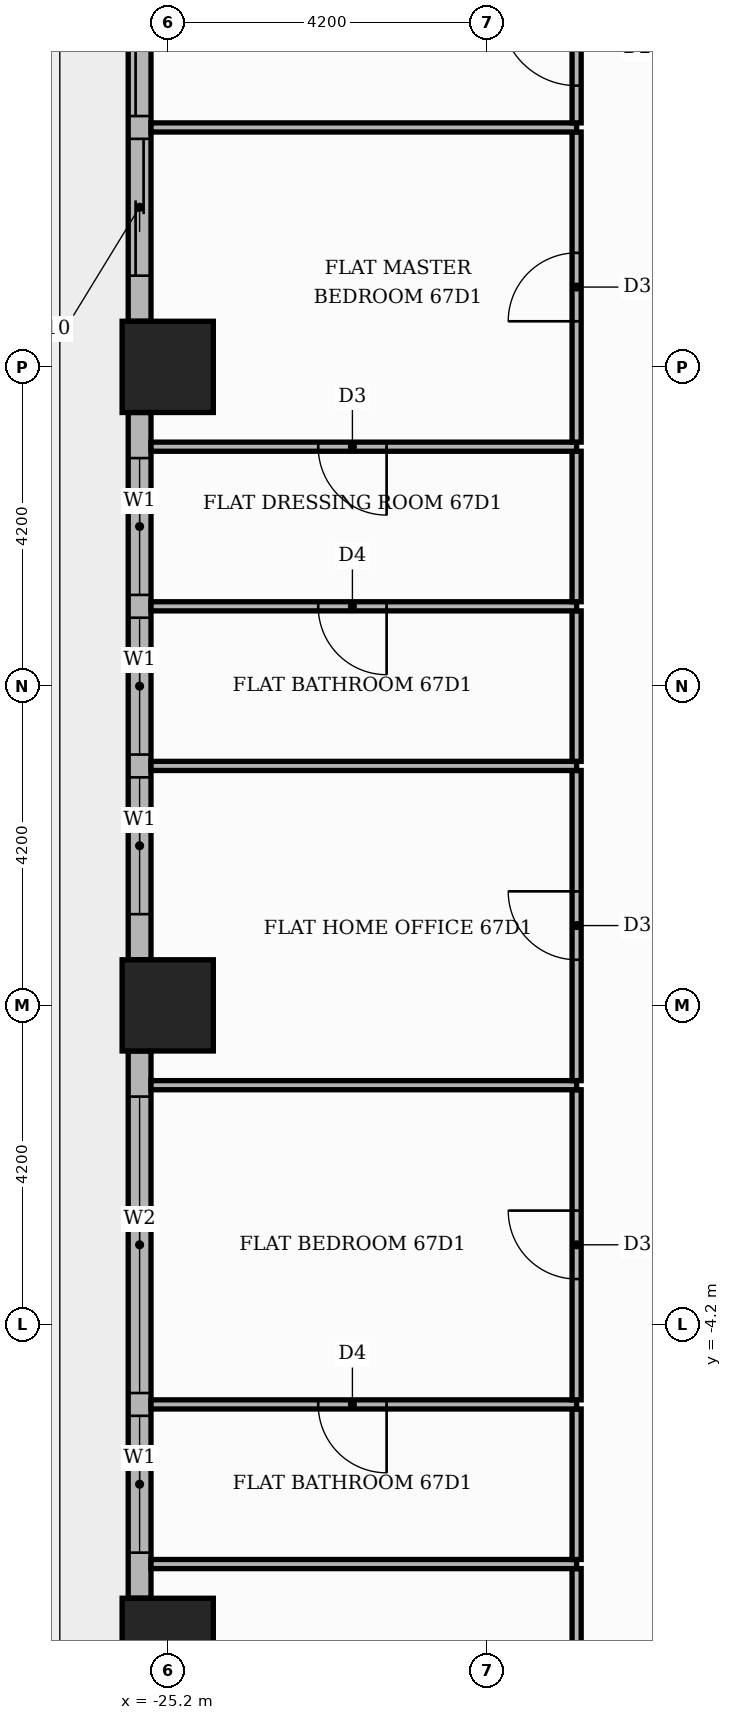
"""IFC4 building model, lengths in metres.
Left out: names, types, materials, properties, quantities, classifications, styles, units other than length and angle.
Written with IfcOpenShell. Run it as: python <this file> out.ifc"""

import sys

from ifc_helpers import new_model, si_unit, direction, frame, frame_2d, origin, origin_2d, place, context, subcontext, project, spatial, rectangle, extrude, element, fill, save


model = new_model("IFC4")
c1 = context("Model", 3, precision=1e-05, world=origin(), true_north=direction((0.0, 1.0)))
c2 = subcontext(c1, "Body", "Model", "MODEL_VIEW")
j1 = project(units=[si_unit("LENGTHUNIT", "METRE"), si_unit("PLANEANGLEUNIT", "RADIAN")], contexts=[c1])
p1 = place(None, origin())
s1 = spatial("IfcSite", under=j1, at=p1, CompositionType="ELEMENT")
p2 = place(p1, origin())
s2 = spatial("IfcBuilding", under=s1, at=p2, CompositionType="ELEMENT")
p3 = place(p2, frame((0.0, 0.0, 279.6)))
s3 = spatial("IfcBuildingStorey", under=s2, at=p3, CompositionType="ELEMENT", Elevation=279.6)
for number, where, z_axis, x_axis in (
    (1, (-25.2, 0.0, 0.0), (0.0, 0.0, 1.0), (1.0, 0.0, 0.0)),
    (2, (-25.2, -8.4, 0.0), (0.0, 0.0, 1.0), (1.0, 0.0, 0.0)),
    (3, (-25.2, 8.4, 0.0), (0.0, 0.0, 1.0), (1.0, 0.0, 0.0)),
):
    element("IfcColumn", number, at=place(p3, frame(where, z_axis=z_axis, x_axis=x_axis)), inside=s3, PredefinedType="COLUMN", context=c2, shape_type="SweptSolid", body=[
        extrude(rectangle(XDim=1.2, YDim=1.2, at=origin_2d()), origin(), (0.0, 0.0, 1.0), 3.9),
    ])
p4 = place(p3, frame((-25.57, 16.2, 0.0), z_axis=(0.0, 0.0, 1.0), x_axis=(0.0, -1.0, 0.0)))
e4 = element("IfcWall", 4, at=p4, inside=s3, PredefinedType="STANDARD", context=c2, shape_type="SweptSolid", body=[
    extrude(rectangle(XDim=7.2, YDim=0.3, at=frame_2d((3.6, 0.0))), origin(), (0.0, 0.0, 1.0), 3.48),
])
p5 = place(p4, frame((0.6, 0.0, 0.0)))
e5 = element("IfcOpeningElement", 5, at=p5, cuts=e4, PredefinedType="OPENING", context=c2, shape_type="SweptSolid", body=[
    extrude(rectangle(XDim=3.9, YDim=2.4, at=frame_2d((1.95, 1.2))), frame((0.0, 0.16, 0.0), z_axis=(0.0, -1.0, 0.0), x_axis=(1.0, 0.0, 0.0)), (0.0, 0.0, 1.0), 0.32),
])
p6 = place(p4, frame((4.8, 0.0, 0.0)))
e6 = element("IfcOpeningElement", 6, at=p6, cuts=e4, PredefinedType="OPENING", context=c2, shape_type="SweptSolid", body=[
    extrude(rectangle(XDim=1.8, YDim=2.4, at=frame_2d((0.9, 1.2))), frame((0.0, 0.16, 0.0), z_axis=(0.0, -1.0, 0.0), x_axis=(1.0, 0.0, 0.0)), (0.0, 0.0, 1.0), 0.32),
])
p7 = place(p3, frame((-25.57, 7.8, 0.0), z_axis=(0.0, 0.0, 1.0), x_axis=(0.0, -1.0, 0.0)))
e7 = element("IfcWall", 7, at=p7, inside=s3, PredefinedType="STANDARD", context=c2, shape_type="SweptSolid", body=[
    extrude(rectangle(XDim=7.2, YDim=0.3, at=frame_2d((3.6, 0.0))), origin(), (0.0, 0.0, 1.0), 3.48),
])
p8 = place(p7, frame((0.6, 0.0, 0.9)))
e8 = element("IfcOpeningElement", 8, at=p8, cuts=e7, PredefinedType="OPENING", context=c2, shape_type="SweptSolid", body=[
    extrude(rectangle(XDim=1.8, YDim=2.1, at=frame_2d((0.9, 1.05))), frame((0.0, 0.16, 0.0), z_axis=(0.0, -1.0, 0.0), x_axis=(1.0, 0.0, 0.0)), (0.0, 0.0, 1.0), 0.32),
])
p9 = place(p7, frame((2.7, 0.0, 0.9)))
e9 = element("IfcOpeningElement", 9, at=p9, cuts=e7, PredefinedType="OPENING", context=c2, shape_type="SweptSolid", body=[
    extrude(rectangle(XDim=1.8, YDim=2.1, at=frame_2d((0.9, 1.05))), frame((0.0, 0.16, 0.0), z_axis=(0.0, -1.0, 0.0), x_axis=(1.0, 0.0, 0.0)), (0.0, 0.0, 1.0), 0.32),
])
p10 = place(p7, frame((4.8, 0.0, 0.9)))
e10 = element("IfcOpeningElement", 10, at=p10, cuts=e7, PredefinedType="OPENING", context=c2, shape_type="SweptSolid", body=[
    extrude(rectangle(XDim=1.8, YDim=2.1, at=frame_2d((0.9, 1.05))), frame((0.0, 0.16, 0.0), z_axis=(0.0, -1.0, 0.0), x_axis=(1.0, 0.0, 0.0)), (0.0, 0.0, 1.0), 0.32),
])
p11 = place(p3, frame((-25.57, -0.6, 0.0), z_axis=(0.0, 0.0, 1.0), x_axis=(0.0, -1.0, 0.0)))
e11 = element("IfcWall", 11, at=p11, inside=s3, PredefinedType="STANDARD", context=c2, shape_type="SweptSolid", body=[
    extrude(rectangle(XDim=7.2, YDim=0.3, at=frame_2d((3.6, 0.0))), origin(), (0.0, 0.0, 1.0), 3.48),
])
p12 = place(p11, frame((0.6, 0.0, 0.9)))
e12 = element("IfcOpeningElement", 12, at=p12, cuts=e11, PredefinedType="OPENING", context=c2, shape_type="SweptSolid", body=[
    extrude(rectangle(XDim=3.9, YDim=2.1, at=frame_2d((1.95, 1.05))), frame((0.0, 0.16, 0.0), z_axis=(0.0, -1.0, 0.0), x_axis=(1.0, 0.0, 0.0)), (0.0, 0.0, 1.0), 0.32),
])
p13 = place(p11, frame((4.8, 0.0, 0.9)))
e13 = element("IfcOpeningElement", 13, at=p13, cuts=e11, PredefinedType="OPENING", context=c2, shape_type="SweptSolid", body=[
    extrude(rectangle(XDim=1.8, YDim=2.1, at=frame_2d((0.9, 1.05))), frame((0.0, 0.16, 0.0), z_axis=(0.0, -1.0, 0.0), x_axis=(1.0, 0.0, 0.0)), (0.0, 0.0, 1.0), 0.32),
])
p14 = place(p3, frame((-19.82, -11.49, 0.0), z_axis=(0.0, 0.0, 1.0), x_axis=(0.0, 1.0, 0.0)))
e14 = element("IfcWall", 14, at=p14, inside=s3, PredefinedType="PARTITIONING", context=c2, shape_type="SweptSolid", body=[
    extrude(rectangle(XDim=4.08, YDim=0.12, at=frame_2d((2.04, 0.0))), origin(), (0.0, 0.0, 1.0), 3.48),
])
p15 = place(p14, frame((1.59, 0.0, 0.0)))
e15 = element("IfcOpeningElement", 15, at=p15, cuts=e14, PredefinedType="OPENING", context=c2, shape_type="SweptSolid", body=[
    extrude(rectangle(XDim=0.9, YDim=2.1, at=frame_2d((0.45, 1.05))), frame((0.0, 0.07, 0.0), z_axis=(0.0, -1.0, 0.0), x_axis=(1.0, 0.0, 0.0)), (0.0, 0.0, 1.0), 0.14),
])
p16 = place(p3, frame((-25.42, -7.35, 0.0), z_axis=(0.0, 0.0, 1.0), x_axis=(1.0, 0.0, 0.0)))
e16 = element("IfcWall", 16, at=p16, inside=s3, PredefinedType="PARTITIONING", context=c2, shape_type="SweptSolid", body=[
    extrude(rectangle(XDim=5.6, YDim=0.12, at=frame_2d((2.8, 0.0))), origin(), (0.0, 0.0, 1.0), 3.48),
])
p17 = place(p3, frame((-19.82, -7.29, 0.0), z_axis=(0.0, 0.0, 1.0), x_axis=(0.0, 1.0, 0.0)))
e17 = element("IfcWall", 17, at=p17, inside=s3, PredefinedType="PARTITIONING", context=c2, shape_type="SweptSolid", body=[
    extrude(rectangle(XDim=1.98, YDim=0.12, at=frame_2d((0.99, 0.0))), origin(), (0.0, 0.0, 1.0), 3.48),
])
p18 = place(p3, frame((-25.42, -5.25, 0.0), z_axis=(0.0, 0.0, 1.0), x_axis=(1.0, 0.0, 0.0)))
e18 = element("IfcWall", 18, at=p18, inside=s3, PredefinedType="PARTITIONING", context=c2, shape_type="SweptSolid", body=[
    extrude(rectangle(XDim=5.6, YDim=0.12, at=frame_2d((2.8, 0.0))), origin(), (0.0, 0.0, 1.0), 3.48),
])
p19 = place(p18, frame((2.2, 0.0, 0.0)))
e19 = element("IfcOpeningElement", 19, at=p19, cuts=e18, PredefinedType="OPENING", context=c2, shape_type="SweptSolid", body=[
    extrude(rectangle(XDim=0.9, YDim=2.1, at=frame_2d((0.45, 1.05))), frame((0.0, 0.07, 0.0), z_axis=(0.0, -1.0, 0.0), x_axis=(1.0, 0.0, 0.0)), (0.0, 0.0, 1.0), 0.14),
])
p20 = place(p3, frame((-19.82, -5.19, 0.0), z_axis=(0.0, 0.0, 1.0), x_axis=(0.0, 1.0, 0.0)))
e20 = element("IfcWall", 20, at=p20, inside=s3, PredefinedType="PARTITIONING", context=c2, shape_type="SweptSolid", body=[
    extrude(rectangle(XDim=4.08, YDim=0.12, at=frame_2d((2.04, 0.0))), origin(), (0.0, 0.0, 1.0), 3.48),
])
p21 = place(p20, frame((1.59, 0.0, 0.0)))
e21 = element("IfcOpeningElement", 21, at=p21, cuts=e20, PredefinedType="OPENING", context=c2, shape_type="SweptSolid", body=[
    extrude(rectangle(XDim=0.9, YDim=2.1, at=frame_2d((0.45, 1.05))), frame((0.0, 0.07, 0.0), z_axis=(0.0, -1.0, 0.0), x_axis=(1.0, 0.0, 0.0)), (0.0, 0.0, 1.0), 0.14),
])
p22 = place(p3, frame((-25.42, -1.05, 0.0), z_axis=(0.0, 0.0, 1.0), x_axis=(1.0, 0.0, 0.0)))
e22 = element("IfcWall", 22, at=p22, inside=s3, PredefinedType="PARTITIONING", context=c2, shape_type="SweptSolid", body=[
    extrude(rectangle(XDim=5.6, YDim=0.12, at=frame_2d((2.8, 0.0))), origin(), (0.0, 0.0, 1.0), 3.48),
])
p23 = place(p3, frame((-19.82, -0.99, 0.0), z_axis=(0.0, 0.0, 1.0), x_axis=(0.0, 1.0, 0.0)))
e23 = element("IfcWall", 23, at=p23, inside=s3, PredefinedType="PARTITIONING", context=c2, shape_type="SweptSolid", body=[
    extrude(rectangle(XDim=4.08, YDim=0.12, at=frame_2d((2.04, 0.0))), origin(), (0.0, 0.0, 1.0), 3.48),
])
p24 = place(p23, frame((1.59, 0.0, 0.0)))
e24 = element("IfcOpeningElement", 24, at=p24, cuts=e23, PredefinedType="OPENING", context=c2, shape_type="SweptSolid", body=[
    extrude(rectangle(XDim=0.9, YDim=2.1, at=frame_2d((0.45, 1.05))), frame((0.0, 0.07, 0.0), z_axis=(0.0, -1.0, 0.0), x_axis=(1.0, 0.0, 0.0)), (0.0, 0.0, 1.0), 0.14),
])
p25 = place(p3, frame((-25.42, 3.15, 0.0), z_axis=(0.0, 0.0, 1.0), x_axis=(1.0, 0.0, 0.0)))
e25 = element("IfcWall", 25, at=p25, inside=s3, PredefinedType="PARTITIONING", context=c2, shape_type="SweptSolid", body=[
    extrude(rectangle(XDim=5.6, YDim=0.12, at=frame_2d((2.8, 0.0))), origin(), (0.0, 0.0, 1.0), 3.48),
])
p26 = place(p3, frame((-19.82, 3.21, 0.0), z_axis=(0.0, 0.0, 1.0), x_axis=(0.0, 1.0, 0.0)))
e26 = element("IfcWall", 26, at=p26, inside=s3, PredefinedType="PARTITIONING", context=c2, shape_type="SweptSolid", body=[
    extrude(rectangle(XDim=1.98, YDim=0.12, at=frame_2d((0.99, 0.0))), origin(), (0.0, 0.0, 1.0), 3.48),
])
p27 = place(p3, frame((-25.42, 5.25, 0.0), z_axis=(0.0, 0.0, 1.0), x_axis=(1.0, 0.0, 0.0)))
e27 = element("IfcWall", 27, at=p27, inside=s3, PredefinedType="PARTITIONING", context=c2, shape_type="SweptSolid", body=[
    extrude(rectangle(XDim=5.6, YDim=0.12, at=frame_2d((2.8, 0.0))), origin(), (0.0, 0.0, 1.0), 3.48),
])
p28 = place(p27, frame((2.2, 0.0, 0.0)))
e28 = element("IfcOpeningElement", 28, at=p28, cuts=e27, PredefinedType="OPENING", context=c2, shape_type="SweptSolid", body=[
    extrude(rectangle(XDim=0.9, YDim=2.1, at=frame_2d((0.45, 1.05))), frame((0.0, 0.07, 0.0), z_axis=(0.0, -1.0, 0.0), x_axis=(1.0, 0.0, 0.0)), (0.0, 0.0, 1.0), 0.14),
])
p29 = place(p3, frame((-19.82, 5.31, 0.0), z_axis=(0.0, 0.0, 1.0), x_axis=(0.0, 1.0, 0.0)))
e29 = element("IfcWall", 29, at=p29, inside=s3, PredefinedType="PARTITIONING", context=c2, shape_type="SweptSolid", body=[
    extrude(rectangle(XDim=1.98, YDim=0.12, at=frame_2d((0.99, 0.0))), origin(), (0.0, 0.0, 1.0), 3.48),
])
p30 = place(p3, frame((-25.42, 7.35, 0.0), z_axis=(0.0, 0.0, 1.0), x_axis=(1.0, 0.0, 0.0)))
e30 = element("IfcWall", 30, at=p30, inside=s3, PredefinedType="PARTITIONING", context=c2, shape_type="SweptSolid", body=[
    extrude(rectangle(XDim=5.6, YDim=0.12, at=frame_2d((2.8, 0.0))), origin(), (0.0, 0.0, 1.0), 3.48),
])
p31 = place(p30, frame((2.2, 0.0, 0.0)))
e31 = element("IfcOpeningElement", 31, at=p31, cuts=e30, PredefinedType="OPENING", context=c2, shape_type="SweptSolid", body=[
    extrude(rectangle(XDim=0.9, YDim=2.1, at=frame_2d((0.45, 1.05))), frame((0.0, 0.07, 0.0), z_axis=(0.0, -1.0, 0.0), x_axis=(1.0, 0.0, 0.0)), (0.0, 0.0, 1.0), 0.14),
])
p32 = place(p3, frame((-19.82, 7.41, 0.0), z_axis=(0.0, 0.0, 1.0), x_axis=(0.0, 1.0, 0.0)))
e32 = element("IfcWall", 32, at=p32, inside=s3, PredefinedType="PARTITIONING", context=c2, shape_type="SweptSolid", body=[
    extrude(rectangle(XDim=4.08, YDim=0.12, at=frame_2d((2.04, 0.0))), origin(), (0.0, 0.0, 1.0), 3.48),
])
p33 = place(p32, frame((1.59, 0.0, 0.0)))
e33 = element("IfcOpeningElement", 33, at=p33, cuts=e32, PredefinedType="OPENING", context=c2, shape_type="SweptSolid", body=[
    extrude(rectangle(XDim=0.9, YDim=2.1, at=frame_2d((0.45, 1.05))), frame((0.0, 0.07, 0.0), z_axis=(0.0, -1.0, 0.0), x_axis=(1.0, 0.0, 0.0)), (0.0, 0.0, 1.0), 0.14),
])
p34 = place(p3, frame((-25.42, 11.55, 0.0), z_axis=(0.0, 0.0, 1.0), x_axis=(1.0, 0.0, 0.0)))
e34 = element("IfcWall", 34, at=p34, inside=s3, PredefinedType="PARTITIONING", context=c2, shape_type="SweptSolid", body=[
    extrude(rectangle(XDim=5.6, YDim=0.12, at=frame_2d((2.8, 0.0))), origin(), (0.0, 0.0, 1.0), 3.48),
])
p35 = place(p3, frame((-19.82, 11.61, 0.0), z_axis=(0.0, 0.0, 1.0), x_axis=(0.0, 1.0, 0.0)))
e35 = element("IfcWall", 35, at=p35, inside=s3, PredefinedType="PARTITIONING", context=c2, shape_type="SweptSolid", body=[
    extrude(rectangle(XDim=1.98, YDim=0.12, at=frame_2d((0.99, 0.0))), origin(), (0.0, 0.0, 1.0), 3.48),
])
p36 = place(p35, frame((0.49, 0.0, 0.0)))
e36 = element("IfcOpeningElement", 36, at=p36, cuts=e35, PredefinedType="OPENING", context=c2, shape_type="SweptSolid", body=[
    extrude(rectangle(XDim=1.0, YDim=2.1, at=frame_2d((0.5, 1.05))), frame((0.0, 0.07, 0.0), z_axis=(0.0, -1.0, 0.0), x_axis=(1.0, 0.0, 0.0)), (0.0, 0.0, 1.0), 0.14),
])
p37 = place(p5, origin())
e37 = element("IfcDoor", 37, at=p37, inside=s3, OperationType="SLIDING_TO_LEFT", PredefinedType="DOOR", context=c2, shape_type="SweptSolid", body=[
    extrude(rectangle(XDim=3.9, YDim=2.4, at=frame_2d((1.95, 1.2))), frame((0.0, 0.025, 0.0), z_axis=(0.0, -1.0, 0.0), x_axis=(1.0, 0.0, 0.0)), (0.0, 0.0, 1.0), 0.05),
])
fill(e5, e37)
p38 = place(p6, origin())
e38 = element("IfcDoor", 38, at=p38, inside=s3, OperationType="SLIDING_TO_RIGHT", PredefinedType="DOOR", context=c2, shape_type="SweptSolid", body=[
    extrude(rectangle(XDim=1.8, YDim=2.4, at=frame_2d((0.9, 1.2))), frame((0.0, 0.025, 0.0), z_axis=(0.0, -1.0, 0.0), x_axis=(1.0, 0.0, 0.0)), (0.0, 0.0, 1.0), 0.05),
])
fill(e6, e38)
p39 = place(p8, origin())
e39 = element("IfcWindow", 39, at=p39, inside=s3, PartitioningType="SINGLE_PANEL", PredefinedType="WINDOW", context=c2, shape_type="SweptSolid", body=[
    extrude(rectangle(XDim=1.8, YDim=2.1, at=frame_2d((0.9, 1.05))), frame((0.0, 0.03, 0.0), z_axis=(0.0, -1.0, 0.0), x_axis=(1.0, 0.0, 0.0)), (0.0, 0.0, 1.0), 0.06),
])
fill(e8, e39)
p40 = place(p9, origin())
e40 = element("IfcWindow", 40, at=p40, inside=s3, PartitioningType="SINGLE_PANEL", PredefinedType="WINDOW", context=c2, shape_type="SweptSolid", body=[
    extrude(rectangle(XDim=1.8, YDim=2.1, at=frame_2d((0.9, 1.05))), frame((0.0, 0.03, 0.0), z_axis=(0.0, -1.0, 0.0), x_axis=(1.0, 0.0, 0.0)), (0.0, 0.0, 1.0), 0.06),
])
fill(e9, e40)
p41 = place(p10, origin())
e41 = element("IfcWindow", 41, at=p41, inside=s3, PartitioningType="SINGLE_PANEL", PredefinedType="WINDOW", context=c2, shape_type="SweptSolid", body=[
    extrude(rectangle(XDim=1.8, YDim=2.1, at=frame_2d((0.9, 1.05))), frame((0.0, 0.03, 0.0), z_axis=(0.0, -1.0, 0.0), x_axis=(1.0, 0.0, 0.0)), (0.0, 0.0, 1.0), 0.06),
])
fill(e10, e41)
p42 = place(p12, origin())
e42 = element("IfcWindow", 42, at=p42, inside=s3, PartitioningType="SINGLE_PANEL", PredefinedType="WINDOW", context=c2, shape_type="SweptSolid", body=[
    extrude(rectangle(XDim=3.9, YDim=2.1, at=frame_2d((1.95, 1.05))), frame((0.0, 0.03, 0.0), z_axis=(0.0, -1.0, 0.0), x_axis=(1.0, 0.0, 0.0)), (0.0, 0.0, 1.0), 0.06),
])
fill(e12, e42)
p43 = place(p13, origin())
e43 = element("IfcWindow", 43, at=p43, inside=s3, PartitioningType="SINGLE_PANEL", PredefinedType="WINDOW", context=c2, shape_type="SweptSolid", body=[
    extrude(rectangle(XDim=1.8, YDim=2.1, at=frame_2d((0.9, 1.05))), frame((0.0, 0.03, 0.0), z_axis=(0.0, -1.0, 0.0), x_axis=(1.0, 0.0, 0.0)), (0.0, 0.0, 1.0), 0.06),
])
fill(e13, e43)
p44 = place(p36, origin())
e44 = element("IfcDoor", 44, at=p44, inside=s3, OperationType="SINGLE_SWING_RIGHT", PredefinedType="DOOR", context=c2, shape_type="SweptSolid", body=[
    extrude(rectangle(XDim=1.0, YDim=2.1, at=frame_2d((0.5, 1.05))), frame((0.0, 0.025, 0.0), z_axis=(0.0, -1.0, 0.0), x_axis=(1.0, 0.0, 0.0)), (0.0, 0.0, 1.0), 0.05),
])
fill(e36, e44)
p45 = place(p33, origin())
e45 = element("IfcDoor", 45, at=p45, inside=s3, OperationType="SINGLE_SWING_LEFT", PredefinedType="DOOR", context=c2, shape_type="SweptSolid", body=[
    extrude(rectangle(XDim=0.9, YDim=2.1, at=frame_2d((0.45, 1.05))), frame((0.0, 0.025, 0.0), z_axis=(0.0, -1.0, 0.0), x_axis=(1.0, 0.0, 0.0)), (0.0, 0.0, 1.0), 0.05),
])
fill(e33, e45)
p46 = place(p31, frame((0.9, 0.0, 0.0), z_axis=(0.0, 0.0, 1.0), x_axis=(-1.0, 0.0, 0.0)))
e46 = element("IfcDoor", 46, at=p46, inside=s3, OperationType="SINGLE_SWING_RIGHT", PredefinedType="DOOR", context=c2, shape_type="SweptSolid", body=[
    extrude(rectangle(XDim=0.9, YDim=2.1, at=frame_2d((0.45, 1.05))), frame((0.0, 0.025, 0.0), z_axis=(0.0, -1.0, 0.0), x_axis=(1.0, 0.0, 0.0)), (0.0, 0.0, 1.0), 0.05),
])
fill(e31, e46)
p47 = place(p28, frame((0.9, 0.0, 0.0), z_axis=(0.0, 0.0, 1.0), x_axis=(-1.0, 0.0, 0.0)))
e47 = element("IfcDoor", 47, at=p47, inside=s3, OperationType="SINGLE_SWING_RIGHT", PredefinedType="DOOR", context=c2, shape_type="SweptSolid", body=[
    extrude(rectangle(XDim=0.9, YDim=2.1, at=frame_2d((0.45, 1.05))), frame((0.0, 0.025, 0.0), z_axis=(0.0, -1.0, 0.0), x_axis=(1.0, 0.0, 0.0)), (0.0, 0.0, 1.0), 0.05),
])
fill(e28, e47)
p48 = place(p24, origin())
e48 = element("IfcDoor", 48, at=p48, inside=s3, OperationType="SINGLE_SWING_RIGHT", PredefinedType="DOOR", context=c2, shape_type="SweptSolid", body=[
    extrude(rectangle(XDim=0.9, YDim=2.1, at=frame_2d((0.45, 1.05))), frame((0.0, 0.025, 0.0), z_axis=(0.0, -1.0, 0.0), x_axis=(1.0, 0.0, 0.0)), (0.0, 0.0, 1.0), 0.05),
])
fill(e24, e48)
p49 = place(p21, origin())
e49 = element("IfcDoor", 49, at=p49, inside=s3, OperationType="SINGLE_SWING_RIGHT", PredefinedType="DOOR", context=c2, shape_type="SweptSolid", body=[
    extrude(rectangle(XDim=0.9, YDim=2.1, at=frame_2d((0.45, 1.05))), frame((0.0, 0.025, 0.0), z_axis=(0.0, -1.0, 0.0), x_axis=(1.0, 0.0, 0.0)), (0.0, 0.0, 1.0), 0.05),
])
fill(e21, e49)
p50 = place(p19, frame((0.9, 0.0, 0.0), z_axis=(0.0, 0.0, 1.0), x_axis=(-1.0, 0.0, 0.0)))
e50 = element("IfcDoor", 50, at=p50, inside=s3, OperationType="SINGLE_SWING_RIGHT", PredefinedType="DOOR", context=c2, shape_type="SweptSolid", body=[
    extrude(rectangle(XDim=0.9, YDim=2.1, at=frame_2d((0.45, 1.05))), frame((0.0, 0.025, 0.0), z_axis=(0.0, -1.0, 0.0), x_axis=(1.0, 0.0, 0.0)), (0.0, 0.0, 1.0), 0.05),
])
fill(e19, e50)
save(model, sys.argv[1])
